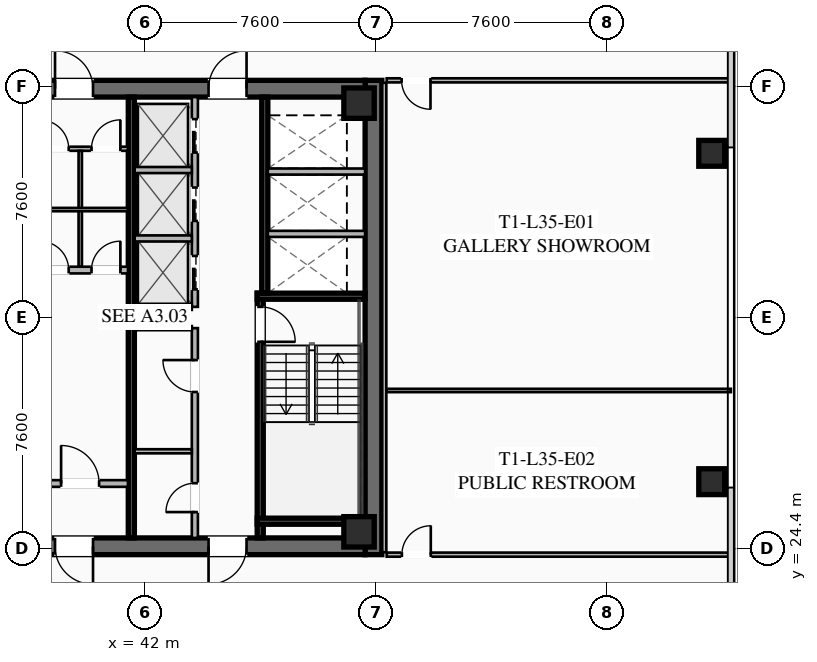
"""IFC4 building model, lengths in metres.
Left out: names, types, materials, properties, quantities, classifications, styles, units other than length and angle.
Written with IfcOpenShell. Run it as: python <this file> out.ifc"""

import sys

from ifc_helpers import new_model, si_unit, direction, frame, frame_2d, origin, origin_2d, place, context, subcontext, project, spatial, rectangle, hollow_rectangle, extrude, element, fill, save


model = new_model("IFC4")
c1 = context("Model", 3, precision=1e-05, world=origin(), true_north=direction((0.0, 1.0)))
c2 = subcontext(c1, "Body", "Model", "MODEL_VIEW")
j1 = project(units=[si_unit("LENGTHUNIT", "METRE"), si_unit("PLANEANGLEUNIT", "RADIAN")], contexts=[c1])
p1 = place(None, origin())
s1 = spatial("IfcSite", under=j1, at=p1, CompositionType="ELEMENT")
p2 = place(p1, origin())
s2 = spatial("IfcBuilding", under=s1, at=p2, CompositionType="ELEMENT")
p3 = place(p2, frame((0.0, 0.0, 132.15)))
s3 = spatial("IfcBuildingStorey", under=s2, at=p3, CompositionType="ELEMENT", Elevation=132.15)
p4 = place(p3, frame((49.525, 39.8, 0.0), z_axis=(0.0, 0.0, 1.0), x_axis=(0.0, -1.0, 0.0)))
e1 = element("IfcWall", 1, at=p4, inside=s3, PredefinedType="SHEAR", context=c2, shape_type="SweptSolid", body=[
    extrude(rectangle(XDim=15.6, YDim=0.55, at=frame_2d((7.8, 0.0))), origin(), (0.0, 0.0, 1.0), 3.55),
])
p5 = place(p3, frame((49.25, 24.475, 0.0), z_axis=(0.0, 0.0, 1.0), x_axis=(-1.0, 0.0, 0.0)))
e2 = element("IfcWall", 2, at=p5, inside=s3, PredefinedType="SHEAR", context=c2, shape_type="SweptSolid", body=[
    extrude(rectangle(XDim=14.5, YDim=0.55, at=frame_2d((7.25, 0.0))), origin(), (0.0, 0.0, 1.0), 3.55),
])
p6 = place(p5, frame((8.95, 0.0, 0.0)))
e3 = element("IfcOpeningElement", 3, at=p6, cuts=e2, PredefinedType="OPENING", context=c2, shape_type="SweptSolid", body=[
    extrude(rectangle(XDim=1.25, YDim=2.25, at=frame_2d((0.625, 1.125))), frame((0.0, 0.285, 0.0), z_axis=(0.0, -1.0, 0.0), x_axis=(1.0, 0.0, 0.0)), (0.0, 0.0, 1.0), 0.57),
])
p7 = place(p5, frame((3.9, 0.0, 0.0)))
e4 = element("IfcOpeningElement", 4, at=p7, cuts=e2, PredefinedType="OPENING", context=c2, shape_type="SweptSolid", body=[
    extrude(rectangle(XDim=1.25, YDim=2.25, at=frame_2d((0.625, 1.125))), frame((0.0, 0.285, 0.0), z_axis=(0.0, -1.0, 0.0), x_axis=(1.0, 0.0, 0.0)), (0.0, 0.0, 1.0), 0.57),
])
p8 = place(p3, frame((34.75, 39.525, 0.0), z_axis=(0.0, 0.0, 1.0), x_axis=(1.0, 0.0, 0.0)))
e5 = element("IfcWall", 5, at=p8, inside=s3, PredefinedType="SHEAR", context=c2, shape_type="SweptSolid", body=[
    extrude(rectangle(XDim=14.5, YDim=0.55, at=frame_2d((7.25, 0.0))), origin(), (0.0, 0.0, 1.0), 3.55),
])
p9 = place(p8, frame((4.3, 0.0, 0.0)))
e6 = element("IfcOpeningElement", 6, at=p9, cuts=e5, PredefinedType="OPENING", context=c2, shape_type="SweptSolid", body=[
    extrude(rectangle(XDim=1.25, YDim=2.25, at=frame_2d((0.625, 1.125))), frame((0.0, 0.285, 0.0), z_axis=(0.0, -1.0, 0.0), x_axis=(1.0, 0.0, 0.0)), (0.0, 0.0, 1.0), 0.57),
])
p10 = place(p8, frame((9.35, 0.0, 0.0)))
e7 = element("IfcOpeningElement", 7, at=p10, cuts=e5, PredefinedType="OPENING", context=c2, shape_type="SweptSolid", body=[
    extrude(rectangle(XDim=1.25, YDim=2.25, at=frame_2d((0.625, 1.125))), frame((0.0, 0.285, 0.0), z_axis=(0.0, -1.0, 0.0), x_axis=(1.0, 0.0, 0.0)), (0.0, 0.0, 1.0), 0.57),
])
for number, where, z_axis, x_axis in (
    (8, (49.05, 24.95, 0.0), (0.0, 0.0, 1.0), (1.0, 0.0, 0.0)),
    (9, (49.05, 39.05, 0.0), (0.0, 0.0, 1.0), (1.0, 0.0, 0.0)),
):
    element("IfcColumn", number, at=place(p3, frame(where, z_axis=z_axis, x_axis=x_axis)), inside=s3, PredefinedType="COLUMN", context=c2, shape_type="SweptSolid", body=[
        extrude(hollow_rectangle(XDim=1.0, YDim=1.0, WallThickness=0.04, at=origin_2d()), origin(), (0.0, 0.0, 1.0), 3.37),
    ])
for number, where, z_axis, x_axis in (
    (10, (60.65, 26.6, 0.0), (0.0, 0.0, 1.0), (1.0, 0.0, 0.0)),
    (11, (60.65, 37.4, 0.0), (0.0, 0.0, 1.0), (1.0, 0.0, 0.0)),
):
    element("IfcColumn", number, at=place(p3, frame(where, z_axis=z_axis, x_axis=x_axis)), inside=s3, PredefinedType="COLUMN", context=c2, shape_type="SweptSolid", body=[
        extrude(hollow_rectangle(XDim=0.85, YDim=0.85, WallThickness=0.035, at=origin_2d()), origin(), (0.0, 0.0, 1.0), 3.37),
    ])
p11 = place(p3, frame((45.8, 32.8, 0.0), z_axis=(0.0, 0.0, 1.0), x_axis=(0.0, -1.0, 0.0)))
e12 = element("IfcWall", 12, at=p11, inside=s3, PredefinedType="SHEAR", context=c2, shape_type="SweptSolid", body=[
    extrude(rectangle(XDim=8.05, YDim=0.2, at=frame_2d((4.025, 0.0))), origin(), (0.0, 0.0, 1.0), 3.37),
])
p12 = place(p11, frame((0.45, 0.0, 0.0)))
e13 = element("IfcOpeningElement", 13, at=p12, cuts=e12, PredefinedType="OPENING", context=c2, shape_type="SweptSolid", body=[
    extrude(rectangle(XDim=1.15, YDim=2.2, at=frame_2d((0.575, 1.1))), frame((0.0, 0.11, 0.0), z_axis=(0.0, -1.0, 0.0), x_axis=(1.0, 0.0, 0.0)), (0.0, 0.0, 1.0), 0.22),
])
for number, where, z_axis, x_axis in (
    (14, (45.7, 32.7, 0.0), (0.0, 0.0, 1.0), (1.0, 0.0, 0.0)),
    (15, (45.7, 25.3, 0.0), (0.0, 0.0, 1.0), (1.0, 0.0, 0.0)),
):
    element("IfcWall", number, at=place(p3, frame(where, z_axis=z_axis, x_axis=x_axis)), inside=s3, PredefinedType="SHEAR", context=c2, shape_type="SweptSolid", body=[
        extrude(rectangle(XDim=3.55, YDim=0.2, at=frame_2d((1.775, 0.0))), origin(), (0.0, 0.0, 1.0), 3.37),
    ])
p13 = place(p3, frame((41.56, 24.75, 0.0), z_axis=(0.0, 0.0, 1.0), x_axis=(0.0, 1.0, 0.0)))
e16 = element("IfcWall", 16, at=p13, inside=s3, PredefinedType="SHEAR", context=c2, shape_type="SweptSolid", body=[
    extrude(rectangle(XDim=14.5, YDim=0.2, at=frame_2d((7.25, 0.0))), origin(), (0.0, 0.0, 1.0), 3.37),
])
p14 = place(p3, frame((38.3, 33.56, 0.0), z_axis=(0.0, 0.0, 1.0), x_axis=(1.0, 0.0, 0.0)))
e17 = element("IfcWall", 17, at=p14, inside=s3, PredefinedType="SOLIDWALL", context=c2, shape_type="SweptSolid", body=[
    extrude(rectangle(XDim=3.15, YDim=0.22, at=frame_2d((1.575, 0.0))), origin(), (0.0, 0.0, 1.0), 2.723),
])
p15 = place(p14, frame((0.25, 0.0, 0.0)))
e18 = element("IfcOpeningElement", 18, at=p15, cuts=e17, PredefinedType="OPENING", context=c2, shape_type="SweptSolid", body=[
    extrude(rectangle(XDim=0.95, YDim=2.05, at=frame_2d((0.475, 1.025))), frame((0.0, 0.12, 0.0), z_axis=(0.0, -1.0, 0.0), x_axis=(1.0, 0.0, 0.0)), (0.0, 0.0, 1.0), 0.24),
])
p16 = place(p14, frame((1.95, 0.0, 0.0)))
e19 = element("IfcOpeningElement", 19, at=p16, cuts=e17, PredefinedType="OPENING", context=c2, shape_type="SweptSolid", body=[
    extrude(rectangle(XDim=0.95, YDim=2.05, at=frame_2d((0.475, 1.025))), frame((0.0, 0.12, 0.0), z_axis=(0.0, -1.0, 0.0), x_axis=(1.0, 0.0, 0.0)), (0.0, 0.0, 1.0), 0.24),
])
p17 = place(p3, frame((38.3, 26.54, 0.0), z_axis=(0.0, 0.0, 1.0), x_axis=(1.0, 0.0, 0.0)))
e20 = element("IfcWall", 20, at=p17, inside=s3, PredefinedType="SOLIDWALL", context=c2, shape_type="SweptSolid", body=[
    extrude(rectangle(XDim=3.15, YDim=0.22, at=frame_2d((1.575, 0.0))), origin(), (0.0, 0.0, 1.0), 2.723),
])
p18 = place(p17, frame((0.95, 0.0, 0.0)))
e21 = element("IfcOpeningElement", 21, at=p18, cuts=e20, PredefinedType="OPENING", context=c2, shape_type="SweptSolid", body=[
    extrude(rectangle(XDim=1.25, YDim=2.25, at=frame_2d((0.625, 1.125))), frame((0.0, 0.12, 0.0), z_axis=(0.0, -1.0, 0.0), x_axis=(1.0, 0.0, 0.0)), (0.0, 0.0, 1.0), 0.24),
])
p19 = place(p3, frame((45.95, 39.25, 0.0), z_axis=(0.0, 0.0, 1.0), x_axis=(0.0, -1.0, 0.0)))
e22 = element("IfcWall", 22, at=p19, inside=s3, PredefinedType="SHEAR", context=c2, shape_type="SweptSolid", body=[
    extrude(rectangle(XDim=6.45, YDim=0.2, at=frame_2d((3.225, 0.0))), origin(), (0.0, 0.0, 1.0), 3.37),
])
for number, where, z_axis, x_axis in (
    (23, (46.05, 34.75, 0.0), (0.0, 0.0, 1.0), (1.0, 0.0, 0.0)),
    (24, (46.05, 36.8, 0.0), (0.0, 0.0, 1.0), (1.0, 0.0, 0.0)),
):
    element("IfcWall", number, at=place(p3, frame(where, z_axis=z_axis, x_axis=x_axis)), inside=s3, PredefinedType="SOLIDWALL", context=c2, shape_type="SweptSolid", body=[
        extrude(rectangle(XDim=3.2, YDim=0.2, at=frame_2d((1.6, 0.0))), origin(), (0.0, 0.0, 1.0), 3.37),
    ])
p20 = place(p3, frame((38.3, 37.55, 0.0), z_axis=(0.0, 0.0, 1.0), x_axis=(1.0, 0.0, 0.0)))
e25 = element("IfcWall", 25, at=p20, inside=s3, PredefinedType="PARTITIONING", context=c2, shape_type="SweptSolid", body=[
    extrude(rectangle(XDim=3.15, YDim=0.135, at=frame_2d((1.575, 0.0))), origin(), (0.0, 0.0, 1.0), 2.723),
])
p21 = place(p20, frame((0.25, 0.0, 0.0)))
e26 = element("IfcOpeningElement", 26, at=p21, cuts=e25, PredefinedType="OPENING", context=c2, shape_type="SweptSolid", body=[
    extrude(rectangle(XDim=0.95, YDim=2.05, at=frame_2d((0.475, 1.025))), frame((0.0, 0.077, 0.0), z_axis=(0.0, -1.0, 0.0), x_axis=(1.0, 0.0, 0.0)), (0.0, 0.0, 1.0), 0.155),
])
p22 = place(p20, frame((1.95, 0.0, 0.0)))
e27 = element("IfcOpeningElement", 27, at=p22, cuts=e25, PredefinedType="OPENING", context=c2, shape_type="SweptSolid", body=[
    extrude(rectangle(XDim=0.95, YDim=2.05, at=frame_2d((0.475, 1.025))), frame((0.0, 0.077, 0.0), z_axis=(0.0, -1.0, 0.0), x_axis=(1.0, 0.0, 0.0)), (0.0, 0.0, 1.0), 0.155),
])
p23 = place(p3, frame((39.88, 33.68, 0.0), z_axis=(0.0, 0.0, 1.0), x_axis=(0.0, 1.0, 0.0)))
e28 = element("IfcWall", 28, at=p23, inside=s3, PredefinedType="PARTITIONING", context=c2, shape_type="SweptSolid", body=[
    extrude(rectangle(XDim=3.8, YDim=0.11, at=frame_2d((1.9, 0.0))), origin(), (0.0, 0.0, 1.0), 2.723),
])
p24 = place(p3, frame((38.3, 35.55, 0.0), z_axis=(0.0, 0.0, 1.0), x_axis=(1.0, 0.0, 0.0)))
e29 = element("IfcWall", 29, at=p24, inside=s3, PredefinedType="PARTITIONING", context=c2, shape_type="SweptSolid", body=[
    extrude(rectangle(XDim=3.15, YDim=0.11, at=frame_2d((1.575, 0.0))), origin(), (0.0, 0.0, 1.0), 2.723),
])
p25 = place(p3, frame((43.65, 24.75, 0.0), z_axis=(0.0, 0.0, 1.0), x_axis=(0.0, 1.0, 0.0)))
e30 = element("IfcWall", 30, at=p25, inside=s3, PredefinedType="SOLIDWALL", context=c2, shape_type="SweptSolid", body=[
    extrude(rectangle(XDim=6.9, YDim=0.2, at=frame_2d((3.45, 0.0))), origin(), (0.0, 0.0, 1.0), 2.723),
])
p26 = place(p25, frame((0.85, 0.0, 0.0)))
e31 = element("IfcOpeningElement", 31, at=p26, cuts=e30, PredefinedType="OPENING", context=c2, shape_type="SweptSolid", body=[
    extrude(rectangle(XDim=0.95, YDim=2.05, at=frame_2d((0.475, 1.025))), frame((0.0, 0.11, 0.0), z_axis=(0.0, -1.0, 0.0), x_axis=(1.0, 0.0, 0.0)), (0.0, 0.0, 1.0), 0.22),
])
p27 = place(p25, frame((4.8, 0.0, 0.0)))
e32 = element("IfcOpeningElement", 32, at=p27, cuts=e30, PredefinedType="OPENING", context=c2, shape_type="SweptSolid", body=[
    extrude(rectangle(XDim=1.05, YDim=2.2, at=frame_2d((0.525, 1.1))), frame((0.0, 0.11, 0.0), z_axis=(0.0, -1.0, 0.0), x_axis=(1.0, 0.0, 0.0)), (0.0, 0.0, 1.0), 0.22),
])
for number, where, z_axis, x_axis in (
    (33, (41.67, 31.65, 0.0), (0.0, 0.0, 1.0), (1.0, 0.0, 0.0)),
    (34, (41.67, 27.6, 0.0), (0.0, 0.0, 1.0), (1.0, 0.0, 0.0)),
):
    element("IfcWall", number, at=place(p3, frame(where, z_axis=z_axis, x_axis=x_axis)), inside=s3, PredefinedType="PARTITIONING", context=c2, shape_type="SweptSolid", body=[
        extrude(rectangle(XDim=1.88, YDim=0.135, at=frame_2d((0.94, 0.0))), origin(), (0.0, 0.0, 1.0), 2.723),
    ])
p28 = place(p3, frame((43.65, 32.35, 0.0), z_axis=(0.0, 0.0, 1.0), x_axis=(0.0, 1.0, 0.0)))
e35 = element("IfcWall", 35, at=p28, inside=s3, PredefinedType="SOLIDWALL", context=c2, shape_type="SweptSolid", body=[
    extrude(rectangle(XDim=6.9, YDim=0.2, at=frame_2d((3.45, 0.0))), origin(), (0.0, 0.0, 1.0), 3.37),
])
p29 = place(p28, frame((0.575, 0.0, 0.0)))
e36 = element("IfcOpeningElement", 36, at=p29, cuts=e35, PredefinedType="OPENING", context=c2, shape_type="SweptSolid", body=[
    extrude(rectangle(XDim=1.1, YDim=2.2, at=frame_2d((0.55, 1.1))), frame((0.0, 0.11, 0.0), z_axis=(0.0, -1.0, 0.0), x_axis=(1.0, 0.0, 0.0)), (0.0, 0.0, 1.0), 0.22),
])
p30 = place(p28, frame((2.825, 0.0, 0.0)))
e37 = element("IfcOpeningElement", 37, at=p30, cuts=e35, PredefinedType="OPENING", context=c2, shape_type="SweptSolid", body=[
    extrude(rectangle(XDim=1.1, YDim=2.2, at=frame_2d((0.55, 1.1))), frame((0.0, 0.11, 0.0), z_axis=(0.0, -1.0, 0.0), x_axis=(1.0, 0.0, 0.0)), (0.0, 0.0, 1.0), 0.22),
])
p31 = place(p28, frame((5.075, 0.0, 0.0)))
e38 = element("IfcOpeningElement", 38, at=p31, cuts=e35, PredefinedType="OPENING", context=c2, shape_type="SweptSolid", body=[
    extrude(rectangle(XDim=1.1, YDim=2.2, at=frame_2d((0.55, 1.1))), frame((0.0, 0.11, 0.0), z_axis=(0.0, -1.0, 0.0), x_axis=(1.0, 0.0, 0.0)), (0.0, 0.0, 1.0), 0.22),
])
for number, where, z_axis, x_axis in (
    (39, (41.67, 32.35, 0.0), (0.0, 0.0, 1.0), (1.0, 0.0, 0.0)),
    (40, (41.67, 34.6, 0.0), (0.0, 0.0, 1.0), (1.0, 0.0, 0.0)),
    (41, (41.67, 36.85, 0.0), (0.0, 0.0, 1.0), (1.0, 0.0, 0.0)),
):
    element("IfcWall", number, at=place(p3, frame(where, z_axis=z_axis, x_axis=x_axis)), inside=s3, PredefinedType="SOLIDWALL", context=c2, shape_type="SweptSolid", body=[
        extrude(rectangle(XDim=1.88, YDim=0.2, at=frame_2d((0.94, 0.0))), origin(), (0.0, 0.0, 1.0), 3.37),
    ])
p32 = place(p3, frame((49.88, 39.72, 0.0), z_axis=(0.0, 0.0, 1.0), x_axis=(0.0, -1.0, 0.0)))
e42 = element("IfcWall", 42, at=p32, inside=s3, PredefinedType="PARTITIONING", context=c2, shape_type="SweptSolid", body=[
    extrude(rectangle(XDim=15.44, YDim=0.135, at=frame_2d((7.72, 0.0))), origin(), (0.0, 0.0, 1.0), 2.723),
])
p33 = place(p3, frame((61.28, 39.8, 0.0), z_axis=(0.0, 0.0, 1.0), x_axis=(-1.0, 0.0, 0.0)))
e43 = element("IfcWall", 43, at=p33, inside=s3, PredefinedType="PARTITIONING", context=c2, shape_type="SweptSolid", body=[
    extrude(rectangle(XDim=11.32, YDim=0.135, at=frame_2d((5.66, 0.0))), origin(), (0.0, 0.0, 1.0), 2.723),
])
p34 = place(p33, frame((9.88, 0.0, 0.0)))
e44 = element("IfcOpeningElement", 44, at=p34, cuts=e43, PredefinedType="OPENING", context=c2, shape_type="SweptSolid", body=[
    extrude(rectangle(XDim=0.95, YDim=2.05, at=frame_2d((0.475, 1.025))), frame((0.0, 0.077, 0.0), z_axis=(0.0, -1.0, 0.0), x_axis=(1.0, 0.0, 0.0)), (0.0, 0.0, 1.0), 0.155),
])
p35 = place(p3, frame((49.96, 24.2, 0.0), z_axis=(0.0, 0.0, 1.0), x_axis=(1.0, 0.0, 0.0)))
e45 = element("IfcWall", 45, at=p35, inside=s3, PredefinedType="PARTITIONING", context=c2, shape_type="SweptSolid", body=[
    extrude(rectangle(XDim=11.32, YDim=0.135, at=frame_2d((5.66, 0.0))), origin(), (0.0, 0.0, 1.0), 2.723),
])
p36 = place(p35, frame((0.5, 0.0, 0.0)))
e46 = element("IfcOpeningElement", 46, at=p36, cuts=e45, PredefinedType="OPENING", context=c2, shape_type="SweptSolid", body=[
    extrude(rectangle(XDim=0.95, YDim=2.05, at=frame_2d((0.475, 1.025))), frame((0.0, 0.077, 0.0), z_axis=(0.0, -1.0, 0.0), x_axis=(1.0, 0.0, 0.0)), (0.0, 0.0, 1.0), 0.155),
])
p37 = place(p3, frame((49.96, 29.6, 0.0), z_axis=(0.0, 0.0, 1.0), x_axis=(1.0, 0.0, 0.0)))
e47 = element("IfcWall", 47, at=p37, inside=s3, PredefinedType="PARTITIONING", context=c2, shape_type="SweptSolid", body=[
    extrude(rectangle(XDim=11.32, YDim=0.11, at=frame_2d((5.66, 0.0))), origin(), (0.0, 0.0, 1.0), 2.723),
])
p38 = place(p9, origin())
e48 = element("IfcDoor", 48, at=p38, inside=s3, OperationType="SINGLE_SWING_LEFT", PredefinedType="DOOR", context=c2, shape_type="SweptSolid", body=[
    extrude(rectangle(XDim=1.25, YDim=2.25, at=frame_2d((0.625, 1.125))), frame((0.0, 0.025, 0.0), z_axis=(0.0, -1.0, 0.0), x_axis=(1.0, 0.0, 0.0)), (0.0, 0.0, 1.0), 0.05),
])
fill(e6, e48)
p39 = place(p10, origin())
e49 = element("IfcDoor", 49, at=p39, inside=s3, OperationType="SINGLE_SWING_RIGHT", PredefinedType="DOOR", context=c2, shape_type="SweptSolid", body=[
    extrude(rectangle(XDim=1.25, YDim=2.25, at=frame_2d((0.625, 1.125))), frame((0.0, 0.025, 0.0), z_axis=(0.0, -1.0, 0.0), x_axis=(1.0, 0.0, 0.0)), (0.0, 0.0, 1.0), 0.05),
])
fill(e7, e49)
p40 = place(p6, origin())
e50 = element("IfcDoor", 50, at=p40, inside=s3, OperationType="SINGLE_SWING_LEFT", PredefinedType="DOOR", context=c2, shape_type="SweptSolid", body=[
    extrude(rectangle(XDim=1.25, YDim=2.25, at=frame_2d((0.625, 1.125))), frame((0.0, 0.025, 0.0), z_axis=(0.0, -1.0, 0.0), x_axis=(1.0, 0.0, 0.0)), (0.0, 0.0, 1.0), 0.05),
])
fill(e3, e50)
p41 = place(p7, origin())
e51 = element("IfcDoor", 51, at=p41, inside=s3, OperationType="SINGLE_SWING_RIGHT", PredefinedType="DOOR", context=c2, shape_type="SweptSolid", body=[
    extrude(rectangle(XDim=1.25, YDim=2.25, at=frame_2d((0.625, 1.125))), frame((0.0, 0.025, 0.0), z_axis=(0.0, -1.0, 0.0), x_axis=(1.0, 0.0, 0.0)), (0.0, 0.0, 1.0), 0.05),
])
fill(e4, e51)
p42 = place(p12, origin())
e52 = element("IfcDoor", 52, at=p42, inside=s3, OperationType="SINGLE_SWING_RIGHT", PredefinedType="DOOR", context=c2, shape_type="SweptSolid", body=[
    extrude(rectangle(XDim=1.15, YDim=2.2, at=frame_2d((0.575, 1.1))), frame((0.0, 0.025, 0.0), z_axis=(0.0, -1.0, 0.0), x_axis=(1.0, 0.0, 0.0)), (0.0, 0.0, 1.0), 0.05),
])
fill(e13, e52)
p43 = place(p18, origin())
e53 = element("IfcDoor", 53, at=p43, inside=s3, OperationType="SINGLE_SWING_LEFT", PredefinedType="DOOR", context=c2, shape_type="SweptSolid", body=[
    extrude(rectangle(XDim=1.25, YDim=2.25, at=frame_2d((0.625, 1.125))), frame((0.0, 0.025, 0.0), z_axis=(0.0, -1.0, 0.0), x_axis=(1.0, 0.0, 0.0)), (0.0, 0.0, 1.0), 0.05),
])
fill(e21, e53)
p44 = place(p21, origin())
e54 = element("IfcDoor", 54, at=p44, inside=s3, OperationType="SINGLE_SWING_LEFT", PredefinedType="DOOR", context=c2, shape_type="SweptSolid", body=[
    extrude(rectangle(XDim=0.95, YDim=2.05, at=frame_2d((0.475, 1.025))), frame((0.0, 0.025, 0.0), z_axis=(0.0, -1.0, 0.0), x_axis=(1.0, 0.0, 0.0)), (0.0, 0.0, 1.0), 0.05),
])
fill(e26, e54)
p45 = place(p22, origin())
e55 = element("IfcDoor", 55, at=p45, inside=s3, OperationType="SINGLE_SWING_RIGHT", PredefinedType="DOOR", context=c2, shape_type="SweptSolid", body=[
    extrude(rectangle(XDim=0.95, YDim=2.05, at=frame_2d((0.475, 1.025))), frame((0.0, 0.025, 0.0), z_axis=(0.0, -1.0, 0.0), x_axis=(1.0, 0.0, 0.0)), (0.0, 0.0, 1.0), 0.05),
])
fill(e27, e55)
p46 = place(p15, origin())
e56 = element("IfcDoor", 56, at=p46, inside=s3, OperationType="SINGLE_SWING_LEFT", PredefinedType="DOOR", context=c2, shape_type="SweptSolid", body=[
    extrude(rectangle(XDim=0.95, YDim=2.05, at=frame_2d((0.475, 1.025))), frame((0.0, 0.025, 0.0), z_axis=(0.0, -1.0, 0.0), x_axis=(1.0, 0.0, 0.0)), (0.0, 0.0, 1.0), 0.05),
])
fill(e18, e56)
p47 = place(p16, origin())
e57 = element("IfcDoor", 57, at=p47, inside=s3, OperationType="SINGLE_SWING_RIGHT", PredefinedType="DOOR", context=c2, shape_type="SweptSolid", body=[
    extrude(rectangle(XDim=0.95, YDim=2.05, at=frame_2d((0.475, 1.025))), frame((0.0, 0.025, 0.0), z_axis=(0.0, -1.0, 0.0), x_axis=(1.0, 0.0, 0.0)), (0.0, 0.0, 1.0), 0.05),
])
fill(e19, e57)
p48 = place(p26, origin())
e58 = element("IfcDoor", 58, at=p48, inside=s3, OperationType="SINGLE_SWING_LEFT", PredefinedType="DOOR", context=c2, shape_type="SweptSolid", body=[
    extrude(rectangle(XDim=0.95, YDim=2.05, at=frame_2d((0.475, 1.025))), frame((0.0, 0.025, 0.0), z_axis=(0.0, -1.0, 0.0), x_axis=(1.0, 0.0, 0.0)), (0.0, 0.0, 1.0), 0.05),
])
fill(e31, e58)
p49 = place(p27, origin())
e59 = element("IfcDoor", 59, at=p49, inside=s3, OperationType="SINGLE_SWING_RIGHT", PredefinedType="DOOR", context=c2, shape_type="SweptSolid", body=[
    extrude(rectangle(XDim=1.05, YDim=2.2, at=frame_2d((0.525, 1.1))), frame((0.0, 0.025, 0.0), z_axis=(0.0, -1.0, 0.0), x_axis=(1.0, 0.0, 0.0)), (0.0, 0.0, 1.0), 0.05),
])
fill(e32, e59)
p50 = place(p34, origin())
e60 = element("IfcDoor", 60, at=p50, inside=s3, OperationType="SINGLE_SWING_LEFT", PredefinedType="DOOR", context=c2, shape_type="SweptSolid", body=[
    extrude(rectangle(XDim=0.95, YDim=2.05, at=frame_2d((0.475, 1.025))), frame((0.0, 0.025, 0.0), z_axis=(0.0, -1.0, 0.0), x_axis=(1.0, 0.0, 0.0)), (0.0, 0.0, 1.0), 0.05),
])
fill(e44, e60)
p51 = place(p36, origin())
e61 = element("IfcDoor", 61, at=p51, inside=s3, OperationType="SINGLE_SWING_RIGHT", PredefinedType="DOOR", context=c2, shape_type="SweptSolid", body=[
    extrude(rectangle(XDim=0.95, YDim=2.05, at=frame_2d((0.475, 1.025))), frame((0.0, 0.025, 0.0), z_axis=(0.0, -1.0, 0.0), x_axis=(1.0, 0.0, 0.0)), (0.0, 0.0, 1.0), 0.05),
])
fill(e46, e61)
p52 = place(p29, origin())
e62 = element("IfcDoor", 62, at=p52, inside=s3, OperationType="SLIDING_TO_LEFT", PredefinedType="DOOR", context=c2, shape_type="SweptSolid", body=[
    extrude(rectangle(XDim=1.1, YDim=2.2, at=frame_2d((0.55, 1.1))), frame((0.0, 0.025, 0.0), z_axis=(0.0, -1.0, 0.0), x_axis=(1.0, 0.0, 0.0)), (0.0, 0.0, 1.0), 0.05),
])
fill(e36, e62)
p53 = place(p30, origin())
e63 = element("IfcDoor", 63, at=p53, inside=s3, OperationType="SLIDING_TO_LEFT", PredefinedType="DOOR", context=c2, shape_type="SweptSolid", body=[
    extrude(rectangle(XDim=1.1, YDim=2.2, at=frame_2d((0.55, 1.1))), frame((0.0, 0.025, 0.0), z_axis=(0.0, -1.0, 0.0), x_axis=(1.0, 0.0, 0.0)), (0.0, 0.0, 1.0), 0.05),
])
fill(e37, e63)
p54 = place(p31, origin())
e64 = element("IfcDoor", 64, at=p54, inside=s3, OperationType="SLIDING_TO_LEFT", PredefinedType="DOOR", context=c2, shape_type="SweptSolid", body=[
    extrude(rectangle(XDim=1.1, YDim=2.2, at=frame_2d((0.55, 1.1))), frame((0.0, 0.025, 0.0), z_axis=(0.0, -1.0, 0.0), x_axis=(1.0, 0.0, 0.0)), (0.0, 0.0, 1.0), 0.05),
])
fill(e38, e64)
save(model, sys.argv[1])
